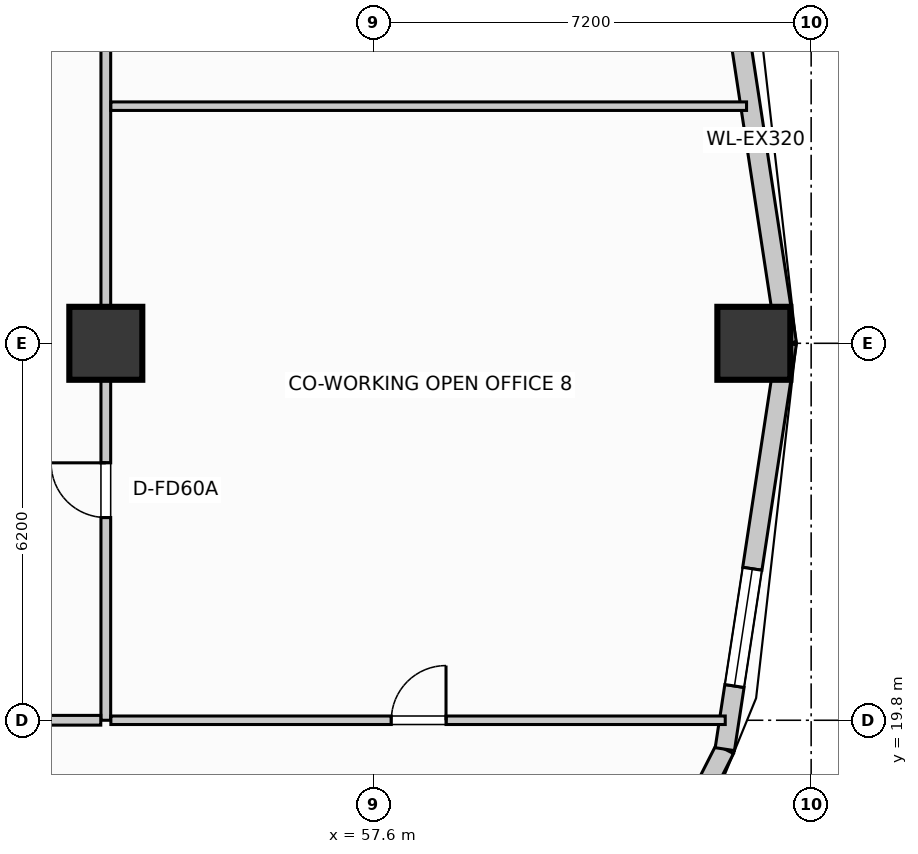
"""IFC4 building model, lengths in metres.
Left out: names, types, materials, properties, quantities, classifications, styles, units other than length and angle.
Written with IfcOpenShell. Run it as: python <this file> out.ifc"""

import sys

from ifc_helpers import new_model, si_unit, direction, frame, frame_2d, origin, origin_2d, place, context, subcontext, project, spatial, rectangle, extrude, element, fill, save


model = new_model("IFC4")
c1 = context("Model", 3, precision=1e-05, world=origin(), true_north=direction((0.0, 1.0)))
c2 = subcontext(c1, "Body", "Model", "MODEL_VIEW")
j1 = project(units=[si_unit("LENGTHUNIT", "METRE"), si_unit("PLANEANGLEUNIT", "RADIAN")], contexts=[c1])
p1 = place(None, origin())
s1 = spatial("IfcSite", under=j1, at=p1, CompositionType="ELEMENT")
p2 = place(p1, origin())
s2 = spatial("IfcBuilding", under=s1, at=p2, CompositionType="ELEMENT")
p3 = place(p2, frame((0.0, 0.0, 105.95)))
s3 = spatial("IfcBuildingStorey", under=s2, at=p3, CompositionType="ELEMENT", Elevation=105.95)
for number, where, z_axis, x_axis in (
    (1, (53.2, 26.0, 0.0), (0.0, 0.0, 1.0), (1.0, 0.0, 0.0)),
    (2, (63.858, 26.0, 0.0), (0.0, 0.0, 1.0), (1.0, 0.0, 0.0)),
):
    element("IfcColumn", number, at=place(p3, frame(where, z_axis=z_axis, x_axis=x_axis)), inside=s3, PredefinedType="COLUMN", context=c2, shape_type="SweptSolid", body=[
        extrude(rectangle(XDim=1.2, YDim=1.2, at=origin_2d()), origin(), (0.0, 0.0, 1.0), 4.5),
    ])
p4 = place(p3, frame((64.398, 26.0, 0.0), z_axis=(0.0, 0.0, 1.0), x_axis=(-0.150633288003, 0.988589708901, 0.0)))
e3 = element("IfcWall", 3, at=p4, inside=s3, PredefinedType="STANDARD", context=c2, shape_type="SweptSolid", body=[
    extrude(rectangle(XDim=6.752, YDim=0.32, at=frame_2d((3.376, 0.0))), origin(), (0.0, 0.0, 1.0), 4.26),
])
p5 = place(p3, frame((60.339, 13.344, 0.0), z_axis=(0.0, 0.0, 1.0), x_axis=(0.453374078001, 0.89132033826, 0.0)))
e4 = element("IfcWall", 4, at=p5, inside=s3, PredefinedType="STANDARD", context=c2, shape_type="SweptSolid", body=[
    extrude(rectangle(XDim=6.71, YDim=0.32, at=frame_2d((3.355, 0.0))), origin(), (0.0, 0.0, 1.0), 3.619),
])
p6 = place(p3, frame((63.381, 19.325, 0.0), z_axis=(0.0, 0.0, 1.0), x_axis=(0.150633288003, 0.988589708901, 0.0)))
e5 = element("IfcWall", 5, at=p6, inside=s3, PredefinedType="STANDARD", context=c2, shape_type="SweptSolid", body=[
    extrude(rectangle(XDim=6.752, YDim=0.32, at=frame_2d((3.376, 0.0))), origin(), (0.0, 0.0, 1.0), 4.26),
])
p7 = place(p6, frame((1.051, 0.0, 0.75)))
e6 = element("IfcOpeningElement", 6, at=p7, cuts=e5, PredefinedType="OPENING", context=c2, shape_type="SweptSolid", body=[
    extrude(rectangle(XDim=1.95, YDim=1.68, at=frame_2d((0.975, 0.84))), frame((0.0, 0.17, 0.0), z_axis=(0.0, -1.0, 0.0), x_axis=(1.0, 0.0, 0.0)), (0.0, 0.0, 1.0), 0.34),
])
p8 = place(p3, frame((53.2, 19.8, 0.0), z_axis=(0.0, 0.0, 1.0), x_axis=(0.0, 1.0, 0.0)))
e7 = element("IfcWall", 7, at=p8, inside=s3, PredefinedType="PARTITIONING", context=c2, shape_type="SweptSolid", body=[
    extrude(rectangle(XDim=15.75, YDim=0.16, at=frame_2d((7.875, 0.0))), origin(), (0.0, 0.0, 1.0), 4.245),
])
p9 = place(p8, frame((3.334, 0.0, 0.0)))
e8 = element("IfcOpeningElement", 8, at=p9, cuts=e7, PredefinedType="OPENING", context=c2, shape_type="SweptSolid", body=[
    extrude(rectangle(XDim=0.9, YDim=2.0, at=frame_2d((0.45, 1.0))), frame((0.0, 0.09, 0.0), z_axis=(0.0, -1.0, 0.0), x_axis=(1.0, 0.0, 0.0)), (0.0, 0.0, 1.0), 0.18),
])
p10 = place(p8, frame((12.527, 0.0, 0.0)))
e9 = element("IfcOpeningElement", 9, at=p10, cuts=e7, PredefinedType="OPENING", context=c2, shape_type="SweptSolid", body=[
    extrude(rectangle(XDim=0.9, YDim=2.0, at=frame_2d((0.45, 1.0))), frame((0.0, 0.09, 0.0), z_axis=(0.0, -1.0, 0.0), x_axis=(1.0, 0.0, 0.0)), (0.0, 0.0, 1.0), 0.18),
])
p11 = place(p3, frame((50.68, 19.8, 0.0), z_axis=(0.0, 0.0, 1.0), x_axis=(1.0, 0.0, 0.0)))
e10 = element("IfcWall", 10, at=p11, inside=s3, PredefinedType="PARTITIONING", context=c2, shape_type="SweptSolid", body=[
    extrude(rectangle(XDim=2.437, YDim=0.16, at=frame_2d((1.219, 0.0))), origin(), (0.0, 0.0, 1.0), 3.618),
])
p12 = place(p3, frame((53.283, 19.8, 0.0), z_axis=(0.0, 0.0, 1.0), x_axis=(1.0, 0.0, 0.0)))
e11 = element("IfcWall", 11, at=p12, inside=s3, PredefinedType="PARTITIONING", context=c2, shape_type="SweptSolid", body=[
    extrude(rectangle(XDim=10.104, YDim=0.14, at=frame_2d((5.052, 0.0))), origin(), (0.0, 0.0, 1.0), 3.618),
])
p13 = place(p12, frame((4.612, 0.0, 0.0)))
e12 = element("IfcOpeningElement", 12, at=p13, cuts=e11, PredefinedType="OPENING", context=c2, shape_type="SweptSolid", body=[
    extrude(rectangle(XDim=0.9, YDim=2.0, at=frame_2d((0.45, 1.0))), frame((0.0, 0.08, 0.0), z_axis=(0.0, -1.0, 0.0), x_axis=(1.0, 0.0, 0.0)), (0.0, 0.0, 1.0), 0.16),
])
p14 = place(p3, frame((53.283, 29.9, 0.0), z_axis=(0.0, 0.0, 1.0), x_axis=(1.0, 0.0, 0.0)))
e13 = element("IfcWall", 13, at=p14, inside=s3, PredefinedType="PARTITIONING", context=c2, shape_type="SweptSolid", body=[
    extrude(rectangle(XDim=10.455, YDim=0.14, at=frame_2d((5.227, 0.0))), origin(), (0.0, 0.0, 1.0), 4.245),
])
p15 = place(p7, origin())
e14 = element("IfcWindow", 14, at=p15, inside=s3, PartitioningType="SINGLE_PANEL", PredefinedType="WINDOW", context=c2, shape_type="SweptSolid", body=[
    extrude(rectangle(XDim=1.95, YDim=1.68, at=frame_2d((0.975, 0.84))), frame((0.0, 0.03, 0.0), z_axis=(0.0, -1.0, 0.0), x_axis=(1.0, 0.0, 0.0)), (0.0, 0.0, 1.0), 0.06),
])
fill(e6, e14)
p16 = place(p9, origin())
e15 = element("IfcDoor", 15, at=p16, inside=s3, OperationType="SINGLE_SWING_RIGHT", PredefinedType="DOOR", context=c2, shape_type="SweptSolid", body=[
    extrude(rectangle(XDim=0.9, YDim=2.0, at=frame_2d((0.45, 1.0))), frame((0.0, 0.025, 0.0), z_axis=(0.0, -1.0, 0.0), x_axis=(1.0, 0.0, 0.0)), (0.0, 0.0, 1.0), 0.05),
])
fill(e8, e15)
p17 = place(p13, origin())
e16 = element("IfcDoor", 16, at=p17, inside=s3, OperationType="SINGLE_SWING_RIGHT", PredefinedType="DOOR", context=c2, shape_type="SweptSolid", body=[
    extrude(rectangle(XDim=0.9, YDim=2.0, at=frame_2d((0.45, 1.0))), frame((0.0, 0.025, 0.0), z_axis=(0.0, -1.0, 0.0), x_axis=(1.0, 0.0, 0.0)), (0.0, 0.0, 1.0), 0.05),
])
fill(e12, e16)
save(model, sys.argv[1])
